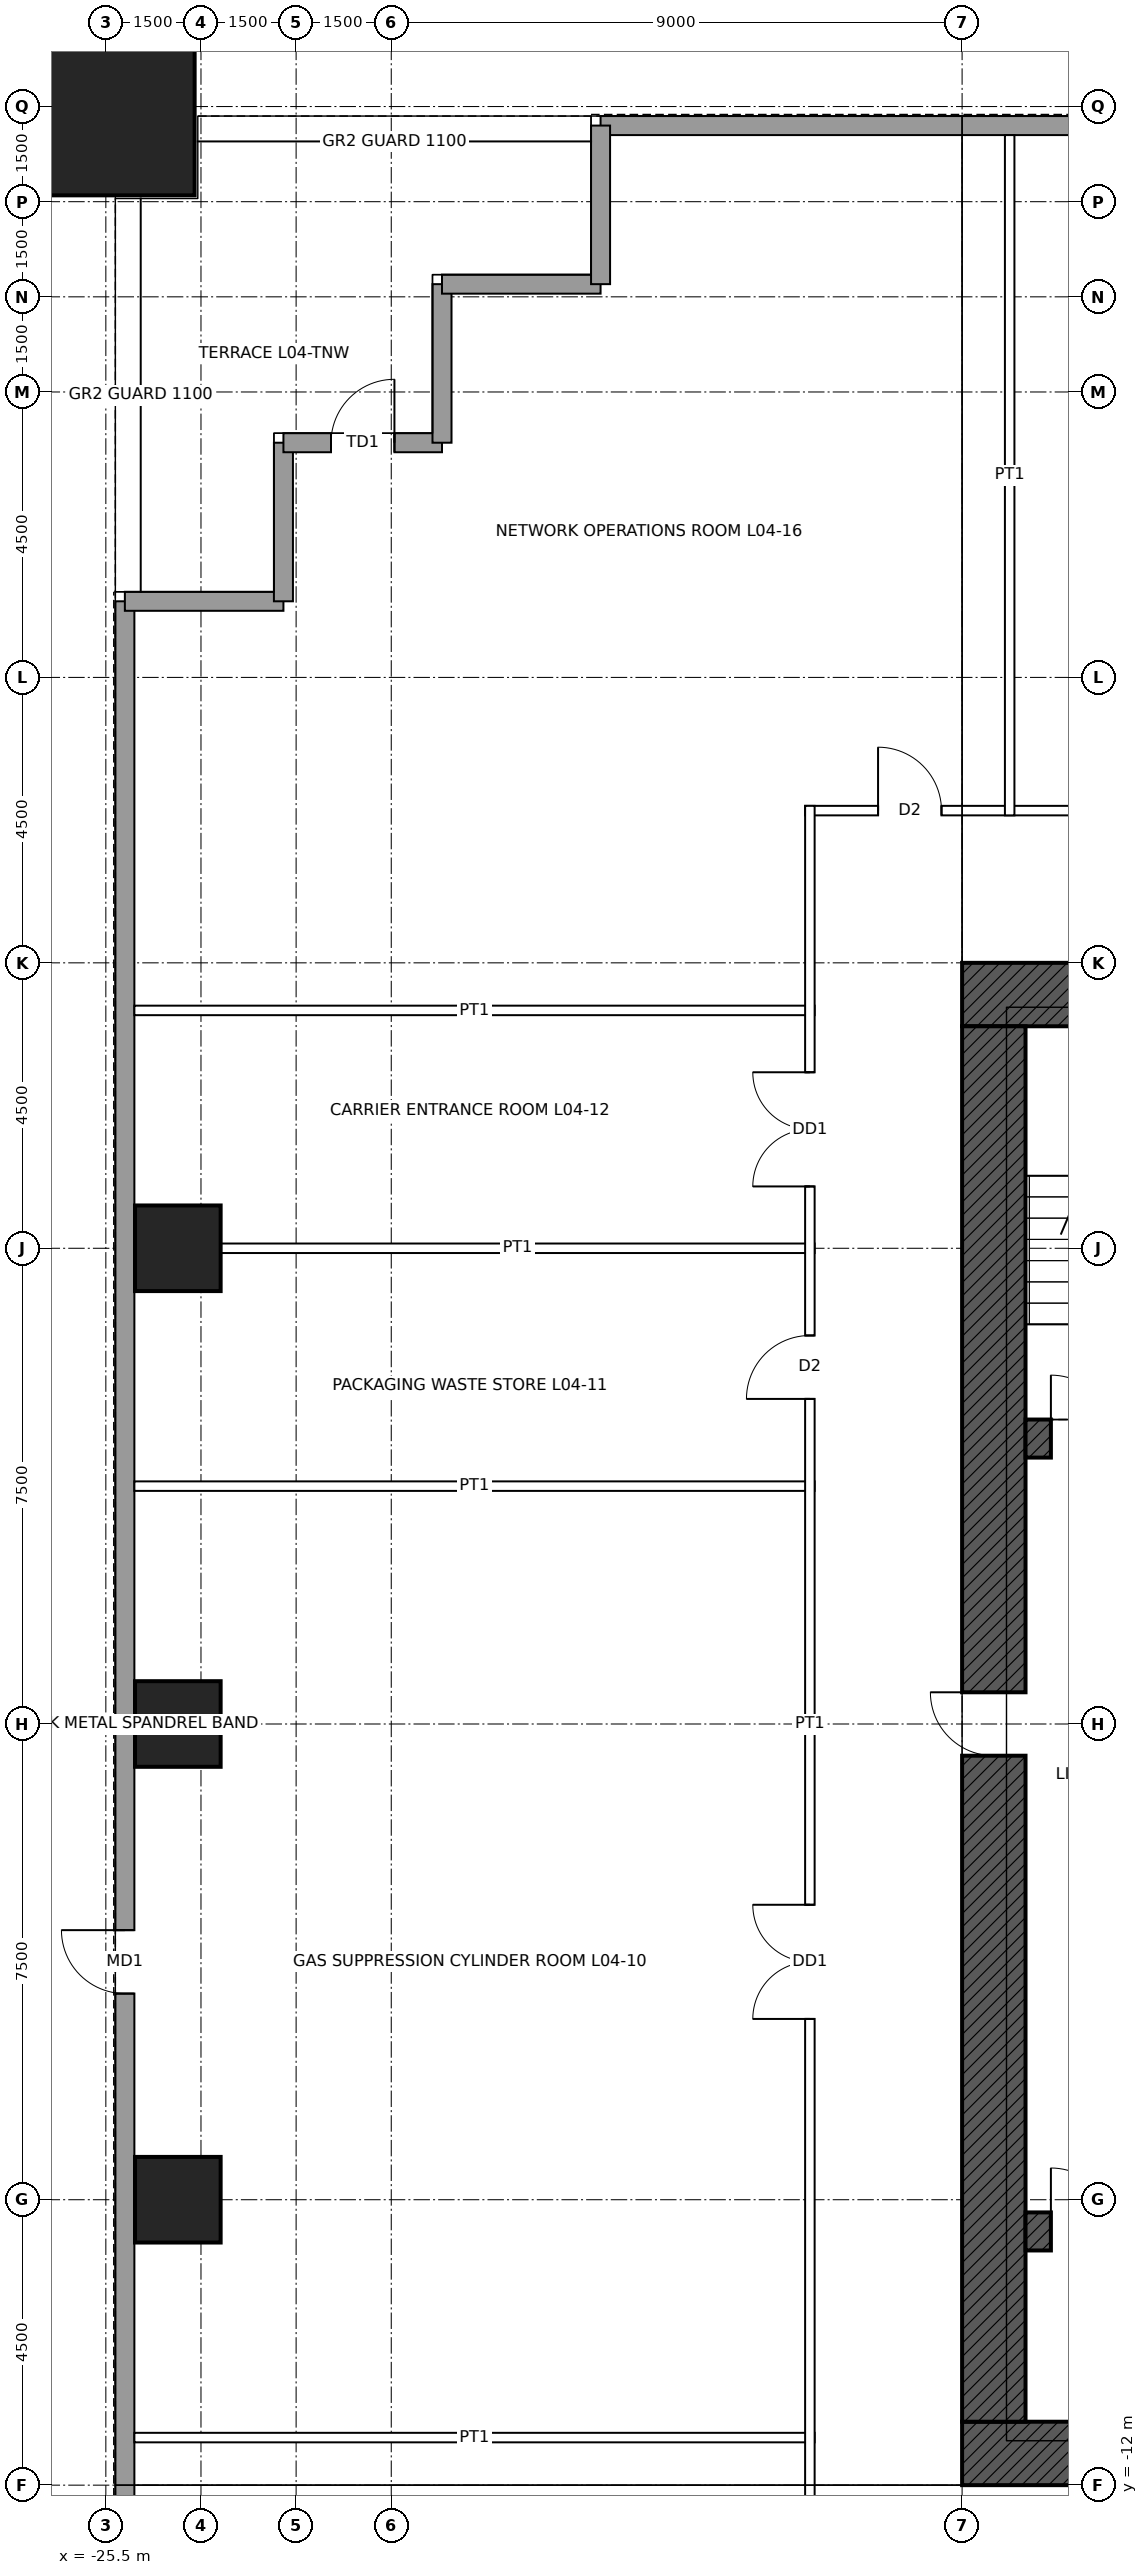
"""IFC4 building model, lengths in metres.
Left out: names, types, materials, properties, quantities, classifications, styles, units other than length and angle.
Written with IfcOpenShell. Run it as: python <this file> out.ifc"""

import sys

from ifc_helpers import new_model, si_unit, direction, frame, frame_2d, origin, origin_2d, place, context, subcontext, project, spatial, rectangle, hollow_rectangle, extrude, element, fill, save


model = new_model("IFC4")
c1 = context("Model", 3, precision=1e-05, world=origin(), true_north=direction((0.0, 1.0)))
c2 = subcontext(c1, "Body", "Model", "MODEL_VIEW")
j1 = project(units=[si_unit("LENGTHUNIT", "METRE"), si_unit("PLANEANGLEUNIT", "RADIAN")], contexts=[c1])
p1 = place(None, origin())
s1 = spatial("IfcSite", under=j1, at=p1, CompositionType="ELEMENT")
p2 = place(p1, origin())
s2 = spatial("IfcBuilding", under=s1, at=p2, CompositionType="ELEMENT")
p3 = place(p2, frame((0.0, 0.0, 23.4)))
s3 = spatial("IfcBuildingStorey", under=s2, at=p3, CompositionType="ELEMENT", Elevation=23.4)
p4 = place(p3, frame((-25.5, 25.5, 0.0), z_axis=(0.0, 0.0, 1.0), x_axis=(1.0, 0.0, 0.0)))
e1 = element("IfcColumn", 1, at=p4, inside=s3, PredefinedType="COLUMN", context=c2, shape_type="SweptSolid", body=[
    extrude(hollow_rectangle(XDim=2.8, YDim=2.8, WallThickness=0.14, at=origin_2d()), origin(), (0.0, 0.0, 1.0), 5.0),
])
for number, where, z_axis, x_axis in (
    (2, (-24.365, -7.5, 0.0), (0.0, 0.0, 1.0), (1.0, 0.0, 0.0)),
    (3, (-24.365, 0.0, 0.0), (0.0, 0.0, 1.0), (1.0, 0.0, 0.0)),
    (4, (-24.365, 7.5, 0.0), (0.0, 0.0, 1.0), (1.0, 0.0, 0.0)),
):
    element("IfcColumn", number, at=place(p3, frame(where, z_axis=z_axis, x_axis=x_axis)), inside=s3, PredefinedType="COLUMN", context=c2, shape_type="SweptSolid", body=[
        extrude(hollow_rectangle(XDim=1.35, YDim=1.35, WallThickness=0.085, at=origin_2d()), origin(), (0.0, 0.0, 1.0), 5.0),
    ])
p5 = place(p3, frame((-12.0, 11.5, 0.0), z_axis=(0.0, 0.0, 1.0), x_axis=(1.0, 0.0, 0.0)))
e5 = element("IfcWall", 5, at=p5, inside=s3, PredefinedType="SHEAR", context=c2, shape_type="SweptSolid", body=[
    extrude(rectangle(XDim=24.0, YDim=1.0, at=frame_2d((12.0, 0.0))), origin(), (0.0, 0.0, 1.0), 5.0),
])
p6 = place(p5, frame((6.25, 0.0, 0.0)))
e6 = element("IfcOpeningElement", 6, at=p6, cuts=e5, PredefinedType="OPENING", context=c2, shape_type="SweptSolid", body=[
    extrude(rectangle(XDim=1.0, YDim=2.4, at=frame_2d((0.5, 1.2))), frame((0.0, 0.51, 0.0), z_axis=(0.0, -1.0, 0.0), x_axis=(1.0, 0.0, 0.0)), (0.0, 0.0, 1.0), 1.02),
])
p7 = place(p5, frame((16.75, 0.0, 0.0)))
e7 = element("IfcOpeningElement", 7, at=p7, cuts=e5, PredefinedType="OPENING", context=c2, shape_type="SweptSolid", body=[
    extrude(rectangle(XDim=1.0, YDim=2.4, at=frame_2d((0.5, 1.2))), frame((0.0, 0.51, 0.0), z_axis=(0.0, -1.0, 0.0), x_axis=(1.0, 0.0, 0.0)), (0.0, 0.0, 1.0), 1.02),
])
p8 = place(p3, frame((12.0, -11.5, 0.0), z_axis=(0.0, 0.0, 1.0), x_axis=(-1.0, 0.0, 0.0)))
e8 = element("IfcWall", 8, at=p8, inside=s3, PredefinedType="SHEAR", context=c2, shape_type="SweptSolid", body=[
    extrude(rectangle(XDim=24.0, YDim=1.0, at=frame_2d((12.0, 0.0))), origin(), (0.0, 0.0, 1.0), 5.0),
])
p9 = place(p8, frame((11.5, 0.0, 0.0)))
e9 = element("IfcOpeningElement", 9, at=p9, cuts=e8, PredefinedType="OPENING", context=c2, shape_type="SweptSolid", body=[
    extrude(rectangle(XDim=1.0, YDim=2.1, at=frame_2d((0.5, 1.05))), frame((0.0, 0.51, 0.0), z_axis=(0.0, -1.0, 0.0), x_axis=(1.0, 0.0, 0.0)), (0.0, 0.0, 1.0), 1.02),
])
p10 = place(p8, frame((1.0, 0.0, 0.0)))
e10 = element("IfcOpeningElement", 10, at=p10, cuts=e8, PredefinedType="OPENING", context=c2, shape_type="SweptSolid", body=[
    extrude(rectangle(XDim=1.0, YDim=2.4, at=frame_2d((0.5, 1.2))), frame((0.0, 0.51, 0.0), z_axis=(0.0, -1.0, 0.0), x_axis=(1.0, 0.0, 0.0)), (0.0, 0.0, 1.0), 1.02),
])
p11 = place(p3, frame((-11.5, -11.0, 0.0), z_axis=(0.0, 0.0, 1.0), x_axis=(0.0, 1.0, 0.0)))
e11 = element("IfcWall", 11, at=p11, inside=s3, PredefinedType="SHEAR", context=c2, shape_type="SweptSolid", body=[
    extrude(rectangle(XDim=22.0, YDim=1.0, at=frame_2d((11.0, 0.0))), origin(), (0.0, 0.0, 1.0), 5.0),
])
p12 = place(p11, frame((10.5, 0.0, 0.0)))
e12 = element("IfcOpeningElement", 12, at=p12, cuts=e11, PredefinedType="OPENING", context=c2, shape_type="SweptSolid", body=[
    extrude(rectangle(XDim=1.0, YDim=2.4, at=frame_2d((0.5, 1.2))), frame((0.0, 0.51, 0.0), z_axis=(0.0, -1.0, 0.0), x_axis=(1.0, 0.0, 0.0)), (0.0, 0.0, 1.0), 1.02),
])
p13 = place(p3, frame((-11.0, 4.5, 0.0), z_axis=(0.0, 0.0, 1.0), x_axis=(1.0, 0.0, 0.0)))
e13 = element("IfcWall", 13, at=p13, inside=s3, PredefinedType="SHEAR", context=c2, shape_type="SweptSolid", body=[
    extrude(rectangle(XDim=22.0, YDim=0.6, at=frame_2d((11.0, 0.0))), origin(), (0.0, 0.0, 1.0), 5.0),
])
p14 = place(p13, frame((0.4, 0.0, 0.0)))
e14 = element("IfcOpeningElement", 14, at=p14, cuts=e13, PredefinedType="OPENING", context=c2, shape_type="SweptSolid", body=[
    extrude(rectangle(XDim=1.0, YDim=2.1, at=frame_2d((0.5, 1.05))), frame((0.0, 0.31, 0.0), z_axis=(0.0, -1.0, 0.0), x_axis=(1.0, 0.0, 0.0)), (0.0, 0.0, 1.0), 0.62),
])
p15 = place(p13, frame((20.6, 0.0, 0.0)))
e15 = element("IfcOpeningElement", 15, at=p15, cuts=e13, PredefinedType="OPENING", context=c2, shape_type="SweptSolid", body=[
    extrude(rectangle(XDim=1.0, YDim=2.1, at=frame_2d((0.5, 1.05))), frame((0.0, 0.31, 0.0), z_axis=(0.0, -1.0, 0.0), x_axis=(1.0, 0.0, 0.0)), (0.0, 0.0, 1.0), 0.62),
])
p16 = place(p3, frame((-11.0, -8.0, 0.0), z_axis=(0.0, 0.0, 1.0), x_axis=(1.0, 0.0, 0.0)))
e16 = element("IfcWall", 16, at=p16, inside=s3, PredefinedType="SHEAR", context=c2, shape_type="SweptSolid", body=[
    extrude(rectangle(XDim=2.0, YDim=0.6, at=frame_2d((1.0, 0.0))), origin(), (0.0, 0.0, 1.0), 5.0),
])
p17 = place(p16, frame((0.4, 0.0, 0.0)))
e17 = element("IfcOpeningElement", 17, at=p17, cuts=e16, PredefinedType="OPENING", context=c2, shape_type="SweptSolid", body=[
    extrude(rectangle(XDim=1.0, YDim=2.1, at=frame_2d((0.5, 1.05))), frame((0.0, 0.31, 0.0), z_axis=(0.0, -1.0, 0.0), x_axis=(1.0, 0.0, 0.0)), (0.0, 0.0, 1.0), 0.62),
])
p18 = place(p3, frame((-17.7, 25.2, 0.0), z_axis=(0.0, 0.0, 1.0), x_axis=(1.0, 0.0, 0.0)))
e18 = element("IfcWall", 18, at=p18, inside=s3, PredefinedType="SOLIDWALL", context=c2, shape_type="SweptSolid", body=[
    extrude(rectangle(XDim=35.4, YDim=0.3, at=frame_2d((17.7, 0.0))), origin(), (0.0, 0.0, 1.0), 4.8),
])
p19 = place(p3, frame((-25.2, -17.7, 0.0), z_axis=(0.0, 0.0, 1.0), x_axis=(0.0, 1.0, 0.0)))
e19 = element("IfcWall", 19, at=p19, inside=s3, PredefinedType="SOLIDWALL", context=c2, shape_type="SweptSolid", body=[
    extrude(rectangle(XDim=35.4, YDim=0.3, at=frame_2d((17.7, 0.0))), origin(), (0.0, 0.0, 1.0), 4.8),
])
p20 = place(p19, frame((13.45, 0.0, 0.0)))
e20 = element("IfcOpeningElement", 20, at=p20, cuts=e19, PredefinedType="OPENING", context=c2, shape_type="SweptSolid", body=[
    extrude(rectangle(XDim=1.0, YDim=2.1, at=frame_2d((0.5, 1.05))), frame((0.0, 0.16, 0.0), z_axis=(0.0, -1.0, 0.0), x_axis=(1.0, 0.0, 0.0)), (0.0, 0.0, 1.0), 0.32),
])
for number, where, z_axis, x_axis in (
    (21, (-25.2, 17.7, 0.0), (0.0, 0.0, 1.0), (1.0, 0.0, 0.0)),
    (22, (-22.7, 17.7, 0.0), (0.0, 0.0, 1.0), (0.0, 1.0, 0.0)),
):
    element("IfcWall", number, at=place(p3, frame(where, z_axis=z_axis, x_axis=x_axis)), inside=s3, PredefinedType="SOLIDWALL", context=c2, shape_type="SweptSolid", body=[
        extrude(rectangle(XDim=2.5, YDim=0.3, at=frame_2d((1.25, 0.0))), origin(), (0.0, 0.0, 1.0), 4.8),
    ])
p21 = place(p3, frame((-22.7, 20.2, 0.0), z_axis=(0.0, 0.0, 1.0), x_axis=(1.0, 0.0, 0.0)))
e23 = element("IfcWall", 23, at=p21, inside=s3, PredefinedType="SOLIDWALL", context=c2, shape_type="SweptSolid", body=[
    extrude(rectangle(XDim=2.5, YDim=0.3, at=frame_2d((1.25, 0.0))), origin(), (0.0, 0.0, 1.0), 4.8),
])
p22 = place(p21, frame((0.75, 0.0, 0.0)))
e24 = element("IfcOpeningElement", 24, at=p22, cuts=e23, PredefinedType="OPENING", context=c2, shape_type="SweptSolid", body=[
    extrude(rectangle(XDim=1.0, YDim=2.4, at=frame_2d((0.5, 1.2))), frame((0.0, 0.16, 0.0), z_axis=(0.0, -1.0, 0.0), x_axis=(1.0, 0.0, 0.0)), (0.0, 0.0, 1.0), 0.32),
])
for number, where, z_axis, x_axis in (
    (25, (-20.2, 20.2, 0.0), (0.0, 0.0, 1.0), (0.0, 1.0, 0.0)),
    (26, (-20.2, 22.7, 0.0), (0.0, 0.0, 1.0), (1.0, 0.0, 0.0)),
    (27, (-17.7, 22.7, 0.0), (0.0, 0.0, 1.0), (0.0, 1.0, 0.0)),
):
    element("IfcWall", number, at=place(p3, frame(where, z_axis=z_axis, x_axis=x_axis)), inside=s3, PredefinedType="SOLIDWALL", context=c2, shape_type="SweptSolid", body=[
        extrude(rectangle(XDim=2.5, YDim=0.3, at=frame_2d((1.25, 0.0))), origin(), (0.0, 0.0, 1.0), 4.8),
    ])
for number, where, z_axis, x_axis in (
    (28, (-25.05, -11.25, 0.0), (0.0, 0.0, 1.0), (1.0, 0.0, 0.0)),
    (29, (-25.05, 3.75, 0.0), (0.0, 0.0, 1.0), (1.0, 0.0, 0.0)),
):
    element("IfcWall", number, at=place(p3, frame(where, z_axis=z_axis, x_axis=x_axis)), inside=s3, PredefinedType="PARTITIONING", context=c2, shape_type="SweptSolid", body=[
        extrude(rectangle(XDim=10.725, YDim=0.15, at=frame_2d((5.363, 0.0))), origin(), (0.0, 0.0, 1.0), 3.853),
    ])
p23 = place(p3, frame((-23.69, 7.5, 0.0), z_axis=(0.0, 0.0, 1.0), x_axis=(1.0, 0.0, 0.0)))
e30 = element("IfcWall", 30, at=p23, inside=s3, PredefinedType="PARTITIONING", context=c2, shape_type="SweptSolid", body=[
    extrude(rectangle(XDim=9.365, YDim=0.15, at=frame_2d((4.683, 0.0))), origin(), (0.0, 0.0, 1.0), 3.853),
])
p24 = place(p3, frame((-25.05, 11.25, 0.0), z_axis=(0.0, 0.0, 1.0), x_axis=(1.0, 0.0, 0.0)))
e31 = element("IfcWall", 31, at=p24, inside=s3, PredefinedType="PARTITIONING", context=c2, shape_type="SweptSolid", body=[
    extrude(rectangle(XDim=10.725, YDim=0.15, at=frame_2d((5.363, 0.0))), origin(), (0.0, 0.0, 1.0), 3.853),
])
p25 = place(p3, frame((-14.475, 14.4, 0.0), z_axis=(0.0, 0.0, 1.0), x_axis=(1.0, 0.0, 0.0)))
e32 = element("IfcWall", 32, at=p25, inside=s3, PredefinedType="PARTITIONING", context=c2, shape_type="SweptSolid", body=[
    extrude(rectangle(XDim=28.95, YDim=0.15, at=frame_2d((14.475, 0.0))), origin(), (0.0, 0.0, 1.0), 4.8),
])
p26 = place(p25, frame((6.475, 0.0, 0.0)))
e33 = element("IfcOpeningElement", 33, at=p26, cuts=e32, PredefinedType="OPENING", context=c2, shape_type="SweptSolid", body=[
    extrude(rectangle(XDim=1.0, YDim=2.1, at=frame_2d((0.5, 1.05))), frame((0.0, 0.085, 0.0), z_axis=(0.0, -1.0, 0.0), x_axis=(1.0, 0.0, 0.0)), (0.0, 0.0, 1.0), 0.17),
])
p27 = place(p25, frame((12.95, 0.0, 0.0)))
e34 = element("IfcOpeningElement", 34, at=p27, cuts=e32, PredefinedType="OPENING", context=c2, shape_type="SweptSolid", body=[
    extrude(rectangle(XDim=1.8, YDim=2.4, at=frame_2d((0.9, 1.2))), frame((0.0, 0.085, 0.0), z_axis=(0.0, -1.0, 0.0), x_axis=(1.0, 0.0, 0.0)), (0.0, 0.0, 1.0), 0.17),
])
p28 = place(p25, frame((20.85, 0.0, 0.0)))
e35 = element("IfcOpeningElement", 35, at=p28, cuts=e32, PredefinedType="OPENING", context=c2, shape_type="SweptSolid", body=[
    extrude(rectangle(XDim=1.0, YDim=2.1, at=frame_2d((0.5, 1.05))), frame((0.0, 0.085, 0.0), z_axis=(0.0, -1.0, 0.0), x_axis=(1.0, 0.0, 0.0)), (0.0, 0.0, 1.0), 0.17),
])
p29 = place(p25, frame((26.8, 0.0, 0.0)))
e36 = element("IfcOpeningElement", 36, at=p29, cuts=e32, PredefinedType="OPENING", context=c2, shape_type="SweptSolid", body=[
    extrude(rectangle(XDim=1.0, YDim=2.1, at=frame_2d((0.5, 1.05))), frame((0.0, 0.085, 0.0), z_axis=(0.0, -1.0, 0.0), x_axis=(1.0, 0.0, 0.0)), (0.0, 0.0, 1.0), 0.17),
])
p30 = place(p25, frame((1.15, 0.0, 0.0)))
e37 = element("IfcOpeningElement", 37, at=p30, cuts=e32, PredefinedType="OPENING", context=c2, shape_type="SweptSolid", body=[
    extrude(rectangle(XDim=1.0, YDim=2.1, at=frame_2d((0.5, 1.05))), frame((0.0, 0.085, 0.0), z_axis=(0.0, -1.0, 0.0), x_axis=(1.0, 0.0, 0.0)), (0.0, 0.0, 1.0), 0.17),
])
p31 = place(p3, frame((-14.4, -14.475, 0.0), z_axis=(0.0, 0.0, 1.0), x_axis=(0.0, 1.0, 0.0)))
e38 = element("IfcWall", 38, at=p31, inside=s3, PredefinedType="PARTITIONING", context=c2, shape_type="SweptSolid", body=[
    extrude(rectangle(XDim=28.95, YDim=0.15, at=frame_2d((14.475, 0.0))), origin(), (0.0, 0.0, 1.0), 4.8),
])
p32 = place(p31, frame((9.825, 0.0, 0.0)))
e39 = element("IfcOpeningElement", 39, at=p32, cuts=e38, PredefinedType="OPENING", context=c2, shape_type="SweptSolid", body=[
    extrude(rectangle(XDim=1.8, YDim=2.4, at=frame_2d((0.9, 1.2))), frame((0.0, 0.085, 0.0), z_axis=(0.0, -1.0, 0.0), x_axis=(1.0, 0.0, 0.0)), (0.0, 0.0, 1.0), 0.17),
])
p33 = place(p31, frame((19.6, 0.0, 0.0)))
e40 = element("IfcOpeningElement", 40, at=p33, cuts=e38, PredefinedType="OPENING", context=c2, shape_type="SweptSolid", body=[
    extrude(rectangle(XDim=1.0, YDim=2.1, at=frame_2d((0.5, 1.05))), frame((0.0, 0.085, 0.0), z_axis=(0.0, -1.0, 0.0), x_axis=(1.0, 0.0, 0.0)), (0.0, 0.0, 1.0), 0.17),
])
p34 = place(p31, frame((22.95, 0.0, 0.0)))
e41 = element("IfcOpeningElement", 41, at=p34, cuts=e38, PredefinedType="OPENING", context=c2, shape_type="SweptSolid", body=[
    extrude(rectangle(XDim=1.8, YDim=2.4, at=frame_2d((0.9, 1.2))), frame((0.0, 0.085, 0.0), z_axis=(0.0, -1.0, 0.0), x_axis=(1.0, 0.0, 0.0)), (0.0, 0.0, 1.0), 0.17),
])
p35 = place(p3, frame((-11.25, 14.325, 0.0), z_axis=(0.0, 0.0, 1.0), x_axis=(0.0, 1.0, 0.0)))
e42 = element("IfcWall", 42, at=p35, inside=s3, PredefinedType="PARTITIONING", context=c2, shape_type="SweptSolid", body=[
    extrude(rectangle(XDim=10.725, YDim=0.15, at=frame_2d((5.363, 0.0))), origin(), (0.0, 0.0, 1.0), 3.853),
])
p36 = place(p20, origin())
e43 = element("IfcDoor", 43, at=p36, inside=s3, OperationType="SINGLE_SWING_RIGHT", PredefinedType="DOOR", context=c2, shape_type="SweptSolid", body=[
    extrude(rectangle(XDim=1.0, YDim=2.1, at=frame_2d((0.5, 1.05))), frame((0.0, 0.025, 0.0), z_axis=(0.0, -1.0, 0.0), x_axis=(1.0, 0.0, 0.0)), (0.0, 0.0, 1.0), 0.05),
])
fill(e20, e43)
p37 = place(p22, origin())
e44 = element("IfcDoor", 44, at=p37, inside=s3, OperationType="SINGLE_SWING_RIGHT", PredefinedType="DOOR", context=c2, shape_type="SweptSolid", body=[
    extrude(rectangle(XDim=1.0, YDim=2.4, at=frame_2d((0.5, 1.2))), frame((0.0, 0.025, 0.0), z_axis=(0.0, -1.0, 0.0), x_axis=(1.0, 0.0, 0.0)), (0.0, 0.0, 1.0), 0.05),
])
fill(e24, e44)
p38 = place(p14, origin())
e45 = element("IfcDoor", 45, at=p38, inside=s3, OperationType="SINGLE_SWING_LEFT", PredefinedType="DOOR", context=c2, shape_type="SweptSolid", body=[
    extrude(rectangle(XDim=1.0, YDim=2.1, at=frame_2d((0.5, 1.05))), frame((0.0, 0.025, 0.0), z_axis=(0.0, -1.0, 0.0), x_axis=(1.0, 0.0, 0.0)), (0.0, 0.0, 1.0), 0.05),
])
fill(e14, e45)
p39 = place(p12, origin())
e46 = element("IfcDoor", 46, at=p39, inside=s3, OperationType="SINGLE_SWING_RIGHT", PredefinedType="DOOR", context=c2, shape_type="SweptSolid", body=[
    extrude(rectangle(XDim=1.0, YDim=2.4, at=frame_2d((0.5, 1.2))), frame((0.0, 0.485, 0.0), z_axis=(0.0, -1.0, 0.0), x_axis=(1.0, 0.0, 0.0)), (0.0, 0.0, 1.0), 0.05),
])
fill(e12, e46)
p40 = place(p17, origin())
e47 = element("IfcDoor", 47, at=p40, inside=s3, OperationType="SINGLE_SWING_LEFT", PredefinedType="DOOR", context=c2, shape_type="SweptSolid", body=[
    extrude(rectangle(XDim=1.0, YDim=2.1, at=frame_2d((0.5, 1.05))), frame((0.0, 0.025, 0.0), z_axis=(0.0, -1.0, 0.0), x_axis=(1.0, 0.0, 0.0)), (0.0, 0.0, 1.0), 0.05),
])
fill(e17, e47)
p41 = place(p32, origin())
e48 = element("IfcDoor", 48, at=p41, inside=s3, OperationType="DOUBLE_DOOR_SINGLE_SWING", PredefinedType="DOOR", context=c2, shape_type="SweptSolid", body=[
    extrude(rectangle(XDim=1.8, YDim=2.4, at=frame_2d((0.9, 1.2))), frame((0.0, 0.025, 0.0), z_axis=(0.0, -1.0, 0.0), x_axis=(1.0, 0.0, 0.0)), (0.0, 0.0, 1.0), 0.05),
])
fill(e39, e48)
p42 = place(p33, origin())
e49 = element("IfcDoor", 49, at=p42, inside=s3, OperationType="SINGLE_SWING_LEFT", PredefinedType="DOOR", context=c2, shape_type="SweptSolid", body=[
    extrude(rectangle(XDim=1.0, YDim=2.1, at=frame_2d((0.5, 1.05))), frame((0.0, 0.025, 0.0), z_axis=(0.0, -1.0, 0.0), x_axis=(1.0, 0.0, 0.0)), (0.0, 0.0, 1.0), 0.05),
])
fill(e40, e49)
p43 = place(p34, origin())
e50 = element("IfcDoor", 50, at=p43, inside=s3, OperationType="DOUBLE_DOOR_SINGLE_SWING", PredefinedType="DOOR", context=c2, shape_type="SweptSolid", body=[
    extrude(rectangle(XDim=1.8, YDim=2.4, at=frame_2d((0.9, 1.2))), frame((0.0, 0.025, 0.0), z_axis=(0.0, -1.0, 0.0), x_axis=(1.0, 0.0, 0.0)), (0.0, 0.0, 1.0), 0.05),
])
fill(e41, e50)
p44 = place(p30, origin())
e51 = element("IfcDoor", 51, at=p44, inside=s3, OperationType="SINGLE_SWING_LEFT", PredefinedType="DOOR", context=c2, shape_type="SweptSolid", body=[
    extrude(rectangle(XDim=1.0, YDim=2.1, at=frame_2d((0.5, 1.05))), frame((0.0, 0.025, 0.0), z_axis=(0.0, -1.0, 0.0), x_axis=(1.0, 0.0, 0.0)), (0.0, 0.0, 1.0), 0.05),
])
fill(e37, e51)
save(model, sys.argv[1])
